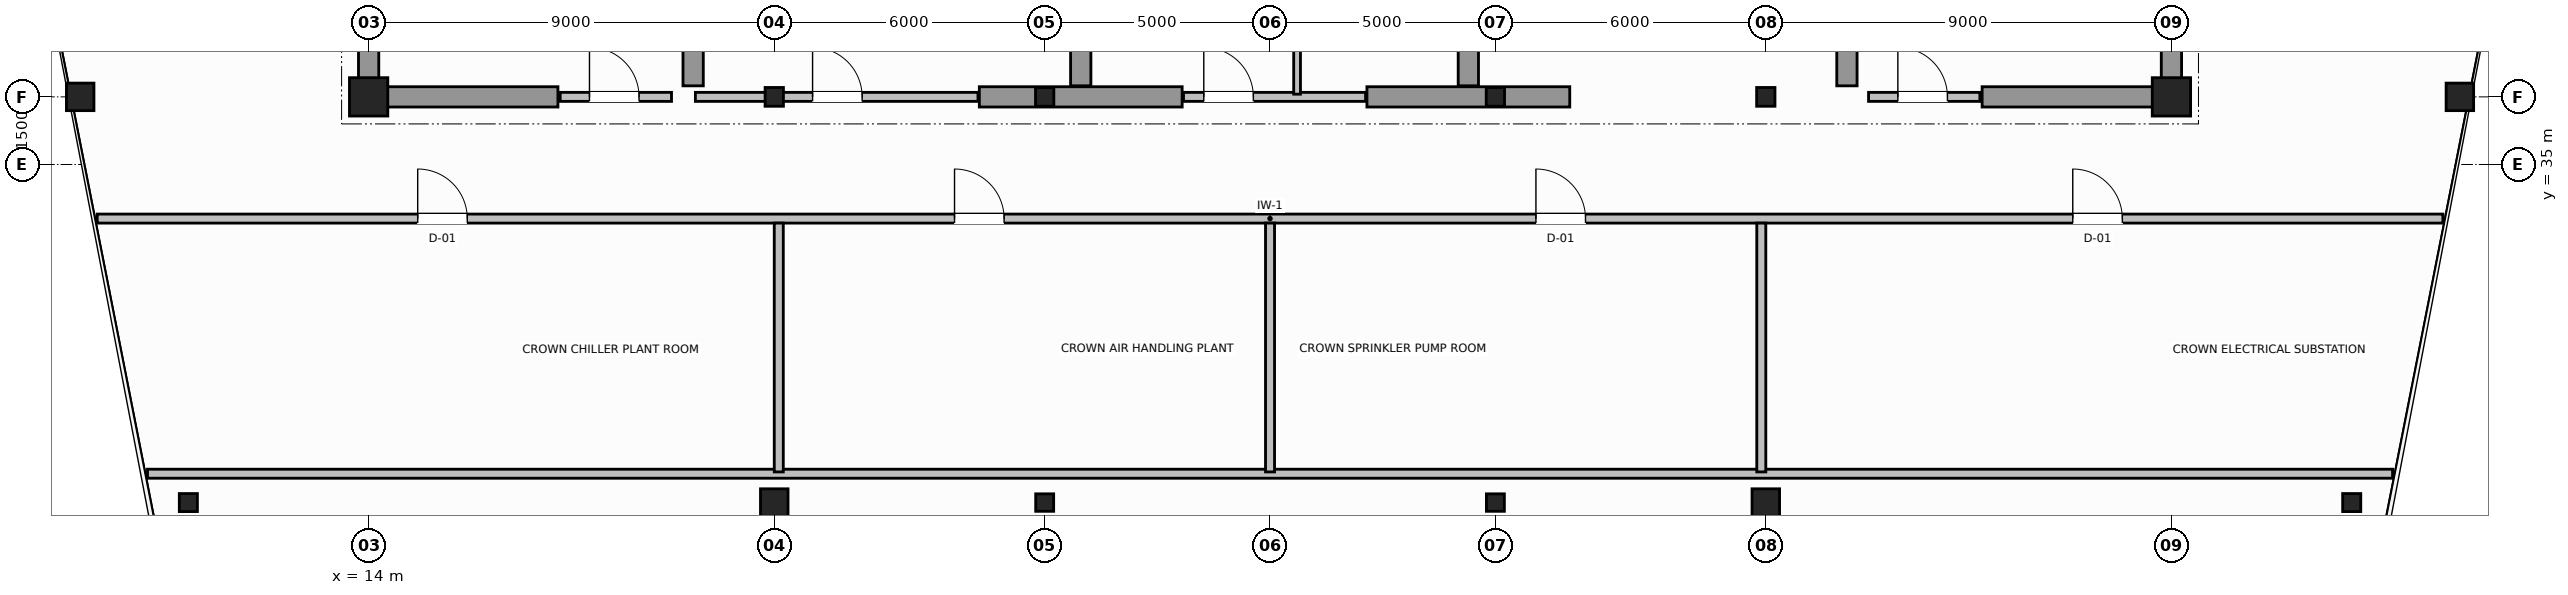
"""IFC4 building model, lengths in metres.
Left out: names, types, materials, properties, quantities, classifications, styles, units other than length and angle.
Written with IfcOpenShell. Run it as: python <this file> out.ifc"""

import sys

from ifc_helpers import new_model, si_unit, direction, frame, frame_2d, origin, origin_2d, place, context, subcontext, project, spatial, rectangle, hollow_circle, i_section, extrude, source, transform, mapped, element, fill, save


model = new_model("IFC4")
c1 = context("Model", 3, precision=1e-05, world=origin(), true_north=direction((0.0, 1.0)))
c2 = subcontext(c1, "Body", "Model", "MODEL_VIEW")
j1 = project(units=[si_unit("LENGTHUNIT", "METRE"), si_unit("PLANEANGLEUNIT", "RADIAN")], contexts=[c1])
p1 = place(None, origin())
s1 = spatial("IfcSite", under=j1, at=p1, CompositionType="ELEMENT")
p2 = place(p1, origin())
s2 = spatial("IfcBuilding", under=s1, at=p2, CompositionType="ELEMENT")
p3 = place(p2, frame((0.0, 0.0, 308.4)))
s3 = spatial("IfcBuildingStorey", under=s2, at=p3, CompositionType="ELEMENT", Elevation=308.4)
m1 = source(origin(), c2, "Body", "SweptSolid", [
    extrude(rectangle(XDim=0.85, YDim=0.85, at=origin_2d()), origin(), (0.0, 0.0, 1.0), 4.4),
])
p4 = place(p3, frame((14.0, 36.5, 0.0), z_axis=(0.0, 0.0, 1.0), x_axis=(1.0, 0.0, 0.0)))
e1 = element("IfcColumn", 1, at=p4, inside=s3, PredefinedType="COLUMN", context=c2, shape_type="MappedRepresentation", body=[
    mapped(m1, transform((0.0, 0.0, 0.0), scale=1.0)),
])
m2 = source(origin(), c2, "Body", "SweptSolid", [
    extrude(i_section(OverallWidth=0.406, OverallDepth=0.416, WebThickness=0.03, FlangeThickness=0.042, FilletRadius=0.015, at=origin_2d()), origin(), (0.0, 0.0, 1.0), 4.4),
])
for number, where, z_axis, x_axis in (
    (2, (23.0, 36.5, 0.0), (0.0, 0.0, 1.0), (1.0, 0.0, 0.0)),
    (3, (29.0, 36.5, 0.0), (0.0, 0.0, 1.0), (1.0, 0.0, 0.0)),
    (4, (39.0, 36.5, 0.0), (0.0, 0.0, 1.0), (1.0, 0.0, 0.0)),
    (5, (45.0, 36.5, 0.0), (0.0, 0.0, 1.0), (1.0, 0.0, 0.0)),
):
    element("IfcColumn", number, at=place(p3, frame(where, z_axis=z_axis, x_axis=x_axis)), inside=s3, PredefinedType="COLUMN", context=c2, shape_type="MappedRepresentation", body=[
        mapped(m2, transform((0.0, 0.0, 0.0), scale=1.0)),
    ])
p5 = place(p3, frame((54.0, 36.5, 0.0), z_axis=(0.0, 0.0, 1.0), x_axis=(1.0, 0.0, 0.0)))
e6 = element("IfcColumn", 6, at=p5, inside=s3, PredefinedType="COLUMN", context=c2, shape_type="MappedRepresentation", body=[
    mapped(m1, transform((0.0, 0.0, 0.0), scale=1.0)),
])
m3 = source(origin(), c2, "Body", "SweptSolid", [
    extrude(hollow_circle(Radius=0.305, WallThickness=0.03, at=origin_2d()), origin(), (0.0, 0.0, 1.0), 4.4),
])
for number, where, z_axis, x_axis in (
    (7, (7.6, 36.5, 0.0), (0.0, 0.0, 1.0), (1.0, 0.0, 0.0)),
    (8, (60.4, 36.5, 0.0), (0.0, 0.0, 1.0), (1.0, 0.0, 0.0)),
):
    element("IfcColumn", number, at=place(p3, frame(where, z_axis=z_axis, x_axis=x_axis)), inside=s3, PredefinedType="COLUMN", context=c2, shape_type="MappedRepresentation", body=[
        mapped(m3, transform((0.0, 0.0, 0.0), scale=1.0)),
    ])
m4 = source(origin(), c2, "Body", "SweptSolid", [
    extrude(i_section(OverallWidth=0.401, OverallDepth=0.399, WebThickness=0.025, FlangeThickness=0.035, FilletRadius=0.015, at=origin_2d()), origin(), (0.0, 0.0, 1.0), 4.4),
])
for number, where, z_axis, x_axis in (
    (9, (10.0, 27.5, 0.0), (0.0, 0.0, 1.0), (1.0, 0.0, 0.0)),
    (10, (58.0, 27.5, 0.0), (0.0, 0.0, 1.0), (1.0, 0.0, 0.0)),
):
    element("IfcColumn", number, at=place(p3, frame(where, z_axis=z_axis, x_axis=x_axis)), inside=s3, PredefinedType="COLUMN", context=c2, shape_type="MappedRepresentation", body=[
        mapped(m4, transform((0.0, 0.0, 0.0), scale=1.0)),
    ])
p6 = place(p3, frame((23.0, 27.5, 0.0), z_axis=(0.0, 0.0, 1.0), x_axis=(1.0, 0.0, 0.0)))
e11 = element("IfcColumn", 11, at=p6, inside=s3, PredefinedType="COLUMN", context=c2, shape_type="MappedRepresentation", body=[
    mapped(m3, transform((0.0, 0.0, 0.0), scale=1.0)),
])
m5 = source(origin(), c2, "Body", "SweptSolid", [
    extrude(i_section(OverallWidth=0.398, OverallDepth=0.387, WebThickness=0.021, FlangeThickness=0.029, FilletRadius=0.015, at=origin_2d()), origin(), (0.0, 0.0, 1.0), 4.4),
])
for number, where, z_axis, x_axis in (
    (12, (29.0, 27.5, 0.0), (0.0, 0.0, 1.0), (1.0, 0.0, 0.0)),
    (13, (39.0, 27.5, 0.0), (0.0, 0.0, 1.0), (1.0, 0.0, 0.0)),
):
    element("IfcColumn", number, at=place(p3, frame(where, z_axis=z_axis, x_axis=x_axis)), inside=s3, PredefinedType="COLUMN", context=c2, shape_type="MappedRepresentation", body=[
        mapped(m5, transform((0.0, 0.0, 0.0), scale=1.0)),
    ])
p7 = place(p3, frame((45.0, 27.5, 0.0), z_axis=(0.0, 0.0, 1.0), x_axis=(1.0, 0.0, 0.0)))
e14 = element("IfcColumn", 14, at=p7, inside=s3, PredefinedType="COLUMN", context=c2, shape_type="MappedRepresentation", body=[
    mapped(m3, transform((0.0, 0.0, 0.0), scale=1.0)),
])
for number, where, z_axis, x_axis in (
    (15, (14.0, 36.5, 0.0), (0.0, 0.0, 1.0), (0.0, 1.0, 0.0)),
    (16, (54.0, 36.5, 0.0), (0.0, 0.0, 1.0), (0.0, 1.0, 0.0)),
):
    element("IfcWall", number, at=place(p3, frame(where, z_axis=z_axis, x_axis=x_axis)), inside=s3, PredefinedType="SHEAR", context=c2, shape_type="SweptSolid", body=[
        extrude(rectangle(XDim=14.5, YDim=0.45, at=frame_2d((7.25, 0.0))), origin(), (0.0, 0.0, 1.0), 4.4),
    ])
p8 = place(p3, frame((14.245, 36.5, 0.0), z_axis=(0.0, 0.0, 1.0), x_axis=(1.0, 0.0, 0.0)))
e17 = element("IfcWall", 17, at=p8, inside=s3, PredefinedType="SHEAR", context=c2, shape_type="SweptSolid", body=[
    extrude(rectangle(XDim=3.955, YDim=0.45, at=frame_2d((1.978, 0.0))), origin(), (0.0, 0.0, 1.0), 3.1),
])
for number, where, z_axis, x_axis in (
    (18, (27.55, 36.5, 0.0), (0.0, 0.0, 1.0), (1.0, 0.0, 0.0)),
    (19, (36.15, 36.5, 0.0), (0.0, 0.0, 1.0), (1.0, 0.0, 0.0)),
):
    element("IfcWall", number, at=place(p3, frame(where, z_axis=z_axis, x_axis=x_axis)), inside=s3, PredefinedType="SHEAR", context=c2, shape_type="SweptSolid", body=[
        extrude(rectangle(XDim=4.5, YDim=0.45, at=frame_2d((2.25, 0.0))), origin(), (0.0, 0.0, 1.0), 4.4),
    ])
p9 = place(p3, frame((49.8, 36.5, 0.0), z_axis=(0.0, 0.0, 1.0), x_axis=(1.0, 0.0, 0.0)))
e20 = element("IfcWall", 20, at=p9, inside=s3, PredefinedType="SHEAR", context=c2, shape_type="SweptSolid", body=[
    extrude(rectangle(XDim=3.955, YDim=0.45, at=frame_2d((1.978, 0.0))), origin(), (0.0, 0.0, 1.0), 3.1),
])
for number, where, z_axis, x_axis in (
    (21, (21.2, 36.745, 0.0), (0.0, 0.0, 1.0), (0.0, 1.0, 0.0)),
    (22, (29.8, 36.745, 0.0), (0.0, 0.0, 1.0), (0.0, 1.0, 0.0)),
    (23, (38.4, 36.745, 0.0), (0.0, 0.0, 1.0), (0.0, 1.0, 0.0)),
    (24, (46.8, 36.745, 0.0), (0.0, 0.0, 1.0), (0.0, 1.0, 0.0)),
):
    element("IfcWall", number, at=place(p3, frame(where, z_axis=z_axis, x_axis=x_axis)), inside=s3, PredefinedType="SHEAR", context=c2, shape_type="SweptSolid", body=[
        extrude(rectangle(XDim=9.455, YDim=0.45, at=frame_2d((4.728, 0.0))), origin(), (0.0, 0.0, 1.0), 4.4),
    ])
p10 = place(p3, frame((18.25, 36.5, 0.0), z_axis=(0.0, 0.0, 1.0), x_axis=(1.0, 0.0, 0.0)))
e25 = element("IfcWall", 25, at=p10, inside=s3, PredefinedType="SOLIDWALL", context=c2, shape_type="SweptSolid", body=[
    extrude(rectangle(XDim=2.47, YDim=0.2, at=frame_2d((1.235, 0.0))), origin(), (0.0, 0.0, 1.0), 3.09),
])
p11 = place(p10, frame((0.65, 0.0, 0.0)))
e26 = element("IfcOpeningElement", 26, at=p11, cuts=e25, PredefinedType="OPENING", context=c2, shape_type="SweptSolid", body=[
    extrude(rectangle(XDim=1.1, YDim=2.15, at=frame_2d((0.55, 1.075))), frame((0.0, 0.11, 0.0), z_axis=(0.0, -1.0, 0.0), x_axis=(1.0, 0.0, 0.0)), (0.0, 0.0, 1.0), 0.22),
])
p12 = place(p3, frame((47.28, 36.5, 0.0), z_axis=(0.0, 0.0, 1.0), x_axis=(1.0, 0.0, 0.0)))
e27 = element("IfcWall", 27, at=p12, inside=s3, PredefinedType="SOLIDWALL", context=c2, shape_type="SweptSolid", body=[
    extrude(rectangle(XDim=2.47, YDim=0.2, at=frame_2d((1.235, 0.0))), origin(), (0.0, 0.0, 1.0), 3.09),
])
p13 = place(p12, frame((0.65, 0.0, 0.0)))
e28 = element("IfcOpeningElement", 28, at=p13, cuts=e27, PredefinedType="OPENING", context=c2, shape_type="SweptSolid", body=[
    extrude(rectangle(XDim=1.1, YDim=2.15, at=frame_2d((0.55, 1.075))), frame((0.0, 0.11, 0.0), z_axis=(0.0, -1.0, 0.0), x_axis=(1.0, 0.0, 0.0)), (0.0, 0.0, 1.0), 0.22),
])
p14 = place(p3, frame((21.25, 36.5, 0.0), z_axis=(0.0, 0.0, 1.0), x_axis=(1.0, 0.0, 0.0)))
e29 = element("IfcWall", 29, at=p14, inside=s3, PredefinedType="SOLIDWALL", context=c2, shape_type="SweptSolid", body=[
    extrude(rectangle(XDim=6.27, YDim=0.2, at=frame_2d((3.135, 0.0))), origin(), (0.0, 0.0, 1.0), 2.89),
])
p15 = place(p14, frame((2.6, 0.0, 0.0)))
e30 = element("IfcOpeningElement", 30, at=p15, cuts=e29, PredefinedType="OPENING", context=c2, shape_type="SweptSolid", body=[
    extrude(rectangle(XDim=1.1, YDim=2.15, at=frame_2d((0.55, 1.075))), frame((0.0, 0.11, 0.0), z_axis=(0.0, -1.0, 0.0), x_axis=(1.0, 0.0, 0.0)), (0.0, 0.0, 1.0), 0.22),
])
p16 = place(p3, frame((32.08, 36.5, 0.0), z_axis=(0.0, 0.0, 1.0), x_axis=(1.0, 0.0, 0.0)))
e31 = element("IfcWall", 31, at=p16, inside=s3, PredefinedType="SOLIDWALL", context=c2, shape_type="SweptSolid", body=[
    extrude(rectangle(XDim=4.04, YDim=0.2, at=frame_2d((2.02, 0.0))), origin(), (0.0, 0.0, 1.0), 2.89),
])
p17 = place(p16, frame((0.45, 0.0, 0.0)))
e32 = element("IfcOpeningElement", 32, at=p17, cuts=e31, PredefinedType="OPENING", context=c2, shape_type="SweptSolid", body=[
    extrude(rectangle(XDim=1.1, YDim=2.15, at=frame_2d((0.55, 1.075))), frame((0.0, 0.11, 0.0), z_axis=(0.0, -1.0, 0.0), x_axis=(1.0, 0.0, 0.0)), (0.0, 0.0, 1.0), 0.22),
])
p18 = place(p3, frame((34.6, 36.56, 0.0), z_axis=(0.0, 0.0, 1.0), x_axis=(0.0, 1.0, 0.0)))
e33 = element("IfcWall", 33, at=p18, inside=s3, PredefinedType="PARTITIONING", context=c2, shape_type="SweptSolid", body=[
    extrude(rectangle(XDim=9.58, YDim=0.15, at=frame_2d((4.79, 0.0))), origin(), (0.0, 0.0, 1.0), 4.1),
])
p19 = place(p18, frame((4.2, 0.0, 0.0)))
e34 = element("IfcOpeningElement", 34, at=p19, cuts=e33, PredefinedType="OPENING", context=c2, shape_type="SweptSolid", body=[
    extrude(rectangle(XDim=0.9, YDim=2.1, at=frame_2d((0.45, 1.05))), frame((0.0, 0.085, 0.0), z_axis=(0.0, -1.0, 0.0), x_axis=(1.0, 0.0, 0.0)), (0.0, 0.0, 1.0), 0.17),
])
p20 = place(p3, frame((7.978, 33.8, 0.0), z_axis=(0.0, 0.0, 1.0), x_axis=(1.0, 0.0, 0.0)))
e35 = element("IfcWall", 35, at=p20, inside=s3, PredefinedType="SOLIDWALL", context=c2, shape_type="SweptSolid", body=[
    extrude(rectangle(XDim=52.044, YDim=0.2, at=frame_2d((26.022, 0.0))), origin(), (0.0, 0.0, 1.0), 4.1),
])
p21 = place(p20, frame((7.111, 0.0, 0.0)))
e36 = element("IfcOpeningElement", 36, at=p21, cuts=e35, PredefinedType="OPENING", context=c2, shape_type="SweptSolid", body=[
    extrude(rectangle(XDim=1.1, YDim=2.15, at=frame_2d((0.55, 1.075))), frame((0.0, 0.11, 0.0), z_axis=(0.0, -1.0, 0.0), x_axis=(1.0, 0.0, 0.0)), (0.0, 0.0, 1.0), 0.22),
])
p22 = place(p20, frame((19.022, 0.0, 0.0)))
e37 = element("IfcOpeningElement", 37, at=p22, cuts=e35, PredefinedType="OPENING", context=c2, shape_type="SweptSolid", body=[
    extrude(rectangle(XDim=1.1, YDim=2.15, at=frame_2d((0.55, 1.075))), frame((0.0, 0.11, 0.0), z_axis=(0.0, -1.0, 0.0), x_axis=(1.0, 0.0, 0.0)), (0.0, 0.0, 1.0), 0.22),
])
p23 = place(p20, frame((31.922, 0.0, 0.0)))
e38 = element("IfcOpeningElement", 38, at=p23, cuts=e35, PredefinedType="OPENING", context=c2, shape_type="SweptSolid", body=[
    extrude(rectangle(XDim=1.1, YDim=2.15, at=frame_2d((0.55, 1.075))), frame((0.0, 0.11, 0.0), z_axis=(0.0, -1.0, 0.0), x_axis=(1.0, 0.0, 0.0)), (0.0, 0.0, 1.0), 0.22),
])
p24 = place(p20, frame((43.833, 0.0, 0.0)))
e39 = element("IfcOpeningElement", 39, at=p24, cuts=e35, PredefinedType="OPENING", context=c2, shape_type="SweptSolid", body=[
    extrude(rectangle(XDim=1.1, YDim=2.15, at=frame_2d((0.55, 1.075))), frame((0.0, 0.11, 0.0), z_axis=(0.0, -1.0, 0.0), x_axis=(1.0, 0.0, 0.0)), (0.0, 0.0, 1.0), 0.22),
])
p25 = place(p3, frame((9.094, 28.14, 0.0), z_axis=(0.0, 0.0, 1.0), x_axis=(1.0, 0.0, 0.0)))
e40 = element("IfcWall", 40, at=p25, inside=s3, PredefinedType="SOLIDWALL", context=c2, shape_type="SweptSolid", body=[
    extrude(rectangle(XDim=49.813, YDim=0.2, at=frame_2d((24.906, 0.0))), origin(), (0.0, 0.0, 1.0), 4.1),
])
p26 = place(p3, frame((23.1, 28.18, 0.0), z_axis=(0.0, 0.0, 1.0), x_axis=(0.0, 1.0, 0.0)))
e41 = element("IfcWall", 41, at=p26, inside=s3, PredefinedType="SOLIDWALL", context=c2, shape_type="SweptSolid", body=[
    extrude(rectangle(XDim=5.52, YDim=0.2, at=frame_2d((2.76, 0.0))), origin(), (0.0, 0.0, 1.0), 2.89),
])
p27 = place(p3, frame((34.0, 28.18, 0.0), z_axis=(0.0, 0.0, 1.0), x_axis=(0.0, 1.0, 0.0)))
e42 = element("IfcWall", 42, at=p27, inside=s3, PredefinedType="SOLIDWALL", context=c2, shape_type="SweptSolid", body=[
    extrude(rectangle(XDim=5.52, YDim=0.2, at=frame_2d((2.76, 0.0))), origin(), (0.0, 0.0, 1.0), 4.1),
])
p28 = place(p3, frame((44.9, 28.18, 0.0), z_axis=(0.0, 0.0, 1.0), x_axis=(0.0, 1.0, 0.0)))
e43 = element("IfcWall", 43, at=p28, inside=s3, PredefinedType="SOLIDWALL", context=c2, shape_type="SweptSolid", body=[
    extrude(rectangle(XDim=5.52, YDim=0.2, at=frame_2d((2.76, 0.0))), origin(), (0.0, 0.0, 1.0), 2.89),
])
m6 = source(origin(), c2, "Body", "SweptSolid", [
    extrude(rectangle(XDim=1.1, YDim=2.15, at=frame_2d((0.55, 1.075))), frame((0.0, 0.025, 0.0), z_axis=(0.0, -1.0, 0.0), x_axis=(1.0, 0.0, 0.0)), (0.0, 0.0, 1.0), 0.05),
])
p29 = place(p11, origin())
e44 = element("IfcDoor", 44, at=p29, inside=s3, OperationType="SINGLE_SWING_RIGHT", PredefinedType="DOOR", context=c2, shape_type="MappedRepresentation", body=[
    mapped(m6, transform((0.0, 0.0, 0.0), scale=1.0)),
])
fill(e26, e44)
p30 = place(p13, origin())
e45 = element("IfcDoor", 45, at=p30, inside=s3, OperationType="SINGLE_SWING_LEFT", PredefinedType="DOOR", context=c2, shape_type="MappedRepresentation", body=[
    mapped(m6, transform((0.0, 0.0, 0.0), scale=1.0)),
])
fill(e28, e45)
p31 = place(p15, origin())
e46 = element("IfcDoor", 46, at=p31, inside=s3, OperationType="SINGLE_SWING_LEFT", PredefinedType="DOOR", context=c2, shape_type="MappedRepresentation", body=[
    mapped(m6, transform((0.0, 0.0, 0.0), scale=1.0)),
])
fill(e30, e46)
p32 = place(p17, origin())
e47 = element("IfcDoor", 47, at=p32, inside=s3, OperationType="SINGLE_SWING_LEFT", PredefinedType="DOOR", context=c2, shape_type="MappedRepresentation", body=[
    mapped(m6, transform((0.0, 0.0, 0.0), scale=1.0)),
])
fill(e32, e47)
p33 = place(p21, origin())
e48 = element("IfcDoor", 48, at=p33, inside=s3, OperationType="SINGLE_SWING_LEFT", PredefinedType="DOOR", context=c2, shape_type="MappedRepresentation", body=[
    mapped(m6, transform((0.0, 0.0, 0.0), scale=1.0)),
])
fill(e36, e48)
p34 = place(p22, origin())
e49 = element("IfcDoor", 49, at=p34, inside=s3, OperationType="SINGLE_SWING_RIGHT", PredefinedType="DOOR", context=c2, shape_type="MappedRepresentation", body=[
    mapped(m6, transform((0.0, 0.0, 0.0), scale=1.0)),
])
fill(e37, e49)
p35 = place(p23, origin())
e50 = element("IfcDoor", 50, at=p35, inside=s3, OperationType="SINGLE_SWING_LEFT", PredefinedType="DOOR", context=c2, shape_type="MappedRepresentation", body=[
    mapped(m6, transform((0.0, 0.0, 0.0), scale=1.0)),
])
fill(e38, e50)
p36 = place(p24, origin())
e51 = element("IfcDoor", 51, at=p36, inside=s3, OperationType="SINGLE_SWING_RIGHT", PredefinedType="DOOR", context=c2, shape_type="MappedRepresentation", body=[
    mapped(m6, transform((0.0, 0.0, 0.0), scale=1.0)),
])
fill(e39, e51)
save(model, sys.argv[1])
